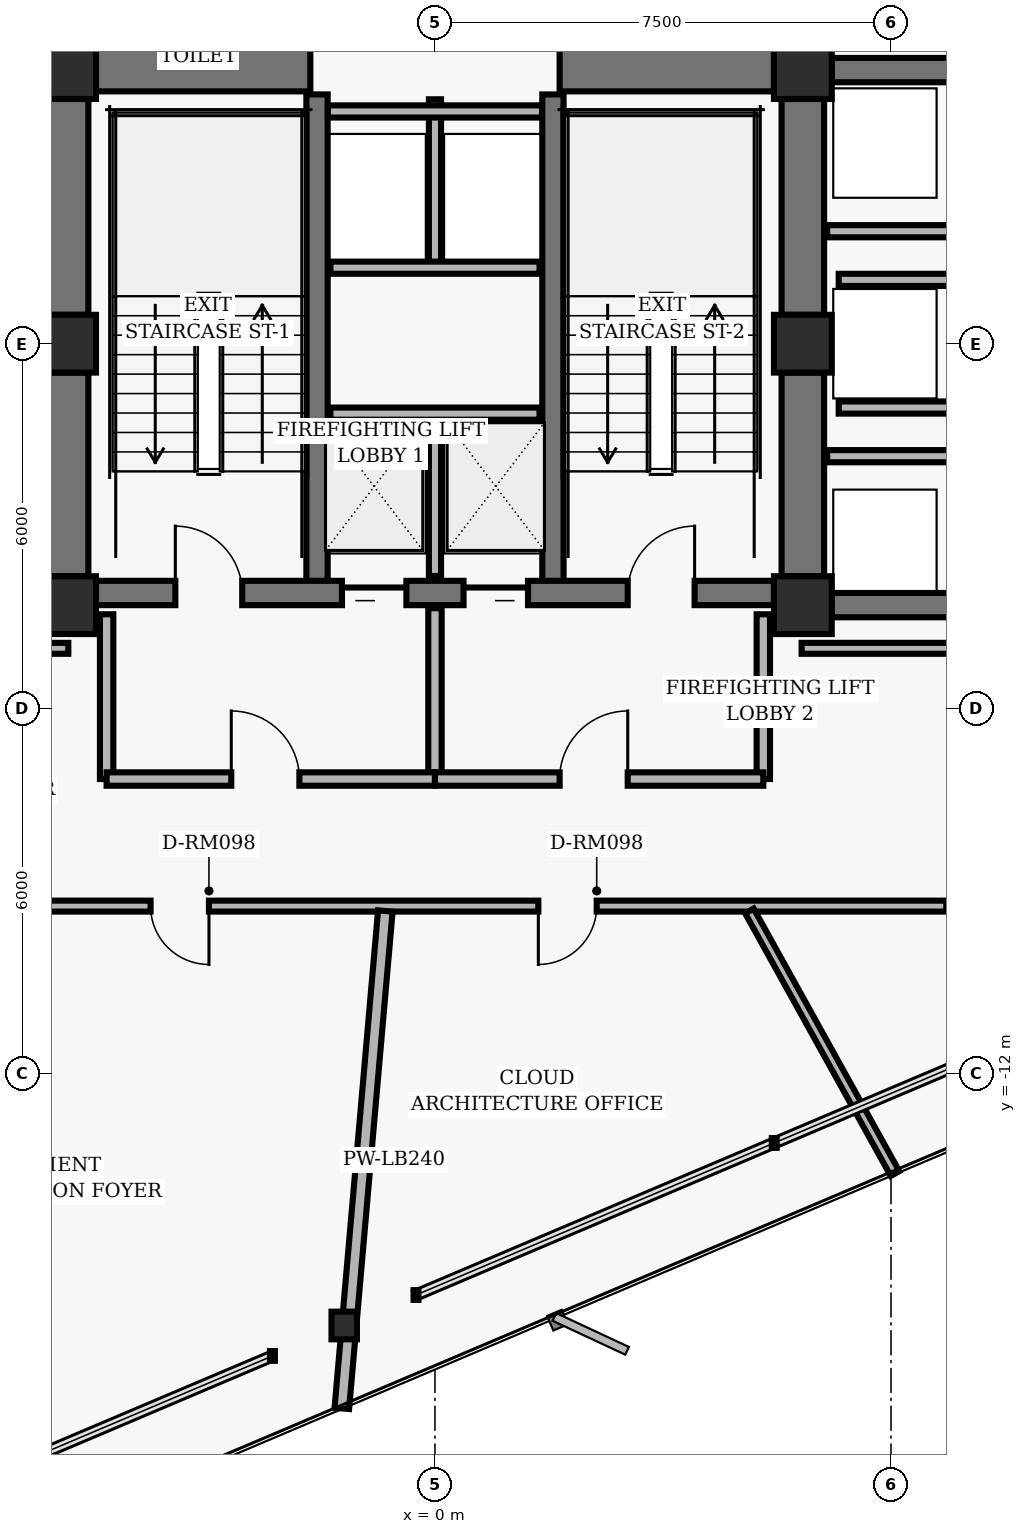
"""IFC4 building model, lengths in metres.
Left out: names, types, materials, properties, quantities, classifications, styles, units other than length and angle.
Written with IfcOpenShell. Run it as: python <this file> out.ifc"""

import sys

from ifc_helpers import new_model, si_unit, direction, frame, frame_2d, origin, origin_2d, place, context, subcontext, project, spatial, rectangle, hollow_rectangle, i_section, extrude, element, fill, save


model = new_model("IFC4")
c1 = context("Model", 3, precision=1e-05, world=origin(), true_north=direction((0.0, 1.0)))
c2 = subcontext(c1, "Body", "Model", "MODEL_VIEW")
j1 = project(units=[si_unit("LENGTHUNIT", "METRE"), si_unit("PLANEANGLEUNIT", "RADIAN")], contexts=[c1])
p1 = place(None, origin())
s1 = spatial("IfcSite", under=j1, at=p1, CompositionType="ELEMENT")
p2 = place(p1, origin())
s2 = spatial("IfcBuilding", under=s1, at=p2, CompositionType="ELEMENT")
p3 = place(p2, frame((0.0, 0.0, 66.4)))
s3 = spatial("IfcBuildingStorey", under=s2, at=p3, CompositionType="ELEMENT", Elevation=66.4)
for number, where, z_axis, x_axis in (
    (1, (-6.05, 4.5, 0.0), (0.0, 0.0, 1.0), (1.0, 0.0, 0.0)),
    (2, (6.05, 4.5, 0.0), (0.0, 0.0, 1.0), (1.0, 0.0, 0.0)),
    (3, (-6.05, 0.0, 0.0), (0.0, 0.0, 1.0), (1.0, 0.0, 0.0)),
    (4, (6.05, 0.0, 0.0), (0.0, 0.0, 1.0), (1.0, 0.0, 0.0)),
    (5, (-6.05, -4.3, 0.0), (0.0, 0.0, 1.0), (1.0, 0.0, 0.0)),
    (6, (6.05, -4.3, 0.0), (0.0, 0.0, 1.0), (1.0, 0.0, 0.0)),
):
    element("IfcColumn", number, at=place(p3, frame(where, z_axis=z_axis, x_axis=x_axis)), inside=s3, PredefinedType="COLUMN", context=c2, shape_type="SweptSolid", body=[
        extrude(hollow_rectangle(XDim=0.95, YDim=0.95, WallThickness=0.06, InnerFilletRadius=0.02, OuterFilletRadius=0.04, at=origin_2d()), origin(), (0.0, 0.0, 1.0), 3.36),
    ])
p4 = place(p3, frame((-6.05, 0.475, 0.0), z_axis=(0.0, 0.0, 1.0), x_axis=(0.0, 1.0, 0.0)))
e7 = element("IfcWall", 7, at=p4, inside=s3, PredefinedType="SHEAR", context=c2, shape_type="SweptSolid", body=[
    extrude(rectangle(XDim=3.55, YDim=0.7, at=frame_2d((1.775, 0.0))), origin(), (0.0, 0.0, 1.0), 3.098),
])
p5 = place(p3, frame((-6.05, -3.825, 0.0), z_axis=(0.0, 0.0, 1.0), x_axis=(0.0, 1.0, 0.0)))
e8 = element("IfcWall", 8, at=p5, inside=s3, PredefinedType="SHEAR", context=c2, shape_type="SweptSolid", body=[
    extrude(rectangle(XDim=3.35, YDim=0.7, at=frame_2d((1.675, 0.0))), origin(), (0.0, 0.0, 1.0), 3.098),
])
p6 = place(p3, frame((6.05, 0.475, 0.0), z_axis=(0.0, 0.0, 1.0), x_axis=(0.0, 1.0, 0.0)))
e9 = element("IfcWall", 9, at=p6, inside=s3, PredefinedType="SHEAR", context=c2, shape_type="SweptSolid", body=[
    extrude(rectangle(XDim=3.55, YDim=0.7, at=frame_2d((1.775, 0.0))), origin(), (0.0, 0.0, 1.0), 3.098),
])
p7 = place(p3, frame((6.05, -3.825, 0.0), z_axis=(0.0, 0.0, 1.0), x_axis=(0.0, 1.0, 0.0)))
e10 = element("IfcWall", 10, at=p7, inside=s3, PredefinedType="SHEAR", context=c2, shape_type="SweptSolid", body=[
    extrude(rectangle(XDim=3.35, YDim=0.7, at=frame_2d((1.675, 0.0))), origin(), (0.0, 0.0, 1.0), 3.098),
])
for number, where, z_axis, x_axis in (
    (11, (-1.94, -4.1, 0.0), (0.0, 0.0, 1.0), (0.0, 1.0, 0.0)),
    (12, (1.94, -4.1, 0.0), (0.0, 0.0, 1.0), (0.0, 1.0, 0.0)),
):
    element("IfcWall", number, at=place(p3, frame(where, z_axis=z_axis, x_axis=x_axis)), inside=s3, PredefinedType="SHEAR", context=c2, shape_type="SweptSolid", body=[
        extrude(rectangle(XDim=8.2, YDim=0.35, at=frame_2d((4.1, 0.0))), origin(), (0.0, 0.0, 1.0), 3.098),
    ])
p8 = place(p3, frame((-5.575, -4.1, 0.0), z_axis=(0.0, 0.0, 1.0), x_axis=(1.0, 0.0, 0.0)))
e13 = element("IfcWall", 13, at=p8, inside=s3, PredefinedType="SHEAR", context=c2, shape_type="SweptSolid", body=[
    extrude(rectangle(XDim=11.15, YDim=0.4, at=frame_2d((5.575, 0.0))), origin(), (0.0, 0.0, 1.0), 3.098),
])
p9 = place(p8, frame((1.305, 0.0, 0.0)))
e14 = element("IfcOpeningElement", 14, at=p9, cuts=e13, PredefinedType="OPENING", context=c2, shape_type="SweptSolid", body=[
    extrude(rectangle(XDim=1.1, YDim=2.04, at=frame_2d((0.55, 1.02))), frame((0.0, 0.21, 0.0), z_axis=(0.0, -1.0, 0.0), x_axis=(1.0, 0.0, 0.0)), (0.0, 0.0, 1.0), 0.42),
])
p10 = place(p8, frame((8.745, 0.0, 0.0)))
e15 = element("IfcOpeningElement", 15, at=p10, cuts=e13, PredefinedType="OPENING", context=c2, shape_type="SweptSolid", body=[
    extrude(rectangle(XDim=1.1, YDim=2.04, at=frame_2d((0.55, 1.02))), frame((0.0, 0.21, 0.0), z_axis=(0.0, -1.0, 0.0), x_axis=(1.0, 0.0, 0.0)), (0.0, 0.0, 1.0), 0.42),
])
p11 = place(p8, frame((4.045, 0.0, 0.0)))
e16 = element("IfcOpeningElement", 16, at=p11, cuts=e13, PredefinedType="OPENING", context=c2, shape_type="SweptSolid", body=[
    extrude(rectangle(XDim=1.06, YDim=2.04, at=frame_2d((0.53, 1.02))), frame((0.0, 0.21, 0.0), z_axis=(0.0, -1.0, 0.0), x_axis=(1.0, 0.0, 0.0)), (0.0, 0.0, 1.0), 0.42),
])
p12 = place(p8, frame((6.045, 0.0, 0.0)))
e17 = element("IfcOpeningElement", 17, at=p12, cuts=e13, PredefinedType="OPENING", context=c2, shape_type="SweptSolid", body=[
    extrude(rectangle(XDim=1.06, YDim=2.04, at=frame_2d((0.53, 1.02))), frame((0.0, 0.21, 0.0), z_axis=(0.0, -1.0, 0.0), x_axis=(1.0, 0.0, 0.0)), (0.0, 0.0, 1.0), 0.42),
])
for number, where, z_axis, x_axis in (
    (18, (-5.575, 4.5, 0.0), (0.0, 0.0, 1.0), (1.0, 0.0, 0.0)),
    (19, (2.05, 4.5, 0.0), (0.0, 0.0, 1.0), (1.0, 0.0, 0.0)),
):
    element("IfcWall", number, at=place(p3, frame(where, z_axis=z_axis, x_axis=x_axis)), inside=s3, PredefinedType="SHEAR", context=c2, shape_type="SweptSolid", body=[
        extrude(rectangle(XDim=3.525, YDim=0.7, at=frame_2d((1.762, 0.0))), origin(), (0.0, 0.0, 1.0), 3.098),
    ])
for number, where, z_axis, x_axis in (
    (20, (6.525, 4.5, 0.0), (0.0, 0.0, 1.0), (1.0, 0.0, 0.0)),
    (21, (6.525, -4.3, 0.0), (0.0, 0.0, 1.0), (1.0, 0.0, 0.0)),
):
    element("IfcWall", number, at=place(p3, frame(where, z_axis=z_axis, x_axis=x_axis)), inside=s3, PredefinedType="SHEAR", context=c2, shape_type="SweptSolid", body=[
        extrude(rectangle(XDim=1.95, YDim=0.4, at=frame_2d((0.975, 0.0))), origin(), (0.0, 0.0, 1.0), 3.098),
    ])
p13 = place(p3, frame((-1.493, -16.148, 0.0), z_axis=(0.0, 0.0, 1.0), x_axis=(1.0, 0.0, 0.0)))
e22 = element("IfcColumn", 22, at=p13, inside=s3, PredefinedType="COLUMN", context=c2, shape_type="SweptSolid", body=[
    extrude(i_section(OverallWidth=0.418, OverallDepth=0.455, WebThickness=0.042, FlangeThickness=0.068, FilletRadius=0.025, at=origin_2d()), origin(), (0.0, 0.0, 1.0), 3.36),
])
p14 = place(p3, frame((0.0, -3.82, 0.0), z_axis=(0.0, 0.0, 1.0), x_axis=(0.0, 1.0, 0.0)))
e23 = element("IfcWall", 23, at=p14, inside=s3, PredefinedType="PARTITIONING", context=c2, shape_type="SweptSolid", body=[
    extrude(rectangle(XDim=2.67, YDim=0.2, at=frame_2d((1.335, 0.0))), origin(), (0.0, 0.0, 1.0), 3.073),
])
p15 = place(p3, frame((-1.72, -1.15, 0.0), z_axis=(0.0, 0.0, 1.0), x_axis=(1.0, 0.0, 0.0)))
e24 = element("IfcWall", 24, at=p15, inside=s3, PredefinedType="PARTITIONING", context=c2, shape_type="SweptSolid", body=[
    extrude(rectangle(XDim=3.44, YDim=0.2, at=frame_2d((1.72, 0.0))), origin(), (0.0, 0.0, 1.0), 3.073),
])
for number, where, z_axis, x_axis in (
    (25, (-5.4, -7.16, 0.0), (0.0, 0.0, 1.0), (0.0, 1.0, 0.0)),
    (26, (5.4, -7.16, 0.0), (0.0, 0.0, 1.0), (0.0, 1.0, 0.0)),
):
    element("IfcWall", number, at=place(p3, frame(where, z_axis=z_axis, x_axis=x_axis)), inside=s3, PredefinedType="PARTITIONING", context=c2, shape_type="SweptSolid", body=[
        extrude(rectangle(XDim=2.71, YDim=0.22, at=frame_2d((1.355, 0.0))), origin(), (0.0, 0.0, 1.0), 3.073),
    ])
p16 = place(p3, frame((0.0, -7.16, 0.0), z_axis=(0.0, 0.0, 1.0), x_axis=(0.0, 1.0, 0.0)))
e27 = element("IfcWall", 27, at=p16, inside=s3, PredefinedType="PARTITIONING", context=c2, shape_type="SweptSolid", body=[
    extrude(rectangle(XDim=2.81, YDim=0.22, at=frame_2d((1.405, 0.0))), origin(), (0.0, 0.0, 1.0), 3.073),
])
p17 = place(p3, frame((-5.4, -7.16, 0.0), z_axis=(0.0, 0.0, 1.0), x_axis=(1.0, 0.0, 0.0)))
e28 = element("IfcWall", 28, at=p17, inside=s3, PredefinedType="PARTITIONING", context=c2, shape_type="SweptSolid", body=[
    extrude(rectangle(XDim=5.4, YDim=0.22, at=frame_2d((2.7, 0.0))), origin(), (0.0, 0.0, 1.0), 2.587),
])
p18 = place(p17, frame((2.05, 0.0, 0.0)))
e29 = element("IfcOpeningElement", 29, at=p18, cuts=e28, PredefinedType="OPENING", context=c2, shape_type="SweptSolid", body=[
    extrude(rectangle(XDim=1.12, YDim=2.02, at=frame_2d((0.56, 1.01))), frame((0.0, 0.12, 0.0), z_axis=(0.0, -1.0, 0.0), x_axis=(1.0, 0.0, 0.0)), (0.0, 0.0, 1.0), 0.24),
])
p19 = place(p3, frame((0.0, -7.16, 0.0), z_axis=(0.0, 0.0, 1.0), x_axis=(1.0, 0.0, 0.0)))
e30 = element("IfcWall", 30, at=p19, inside=s3, PredefinedType="PARTITIONING", context=c2, shape_type="SweptSolid", body=[
    extrude(rectangle(XDim=5.4, YDim=0.22, at=frame_2d((2.7, 0.0))), origin(), (0.0, 0.0, 1.0), 2.587),
])
p20 = place(p19, frame((2.05, 0.0, 0.0)))
e31 = element("IfcOpeningElement", 31, at=p20, cuts=e30, PredefinedType="OPENING", context=c2, shape_type="SweptSolid", body=[
    extrude(rectangle(XDim=1.12, YDim=2.02, at=frame_2d((0.56, 1.01))), frame((0.0, 0.12, 0.0), z_axis=(0.0, -1.0, 0.0), x_axis=(1.0, 0.0, 0.0)), (0.0, 0.0, 1.0), 0.24),
])
p21 = place(p3, frame((0.0, 1.25, 0.0), z_axis=(0.0, 0.0, 1.0), x_axis=(0.0, 1.0, 0.0)))
e32 = element("IfcWall", 32, at=p21, inside=s3, PredefinedType="PARTITIONING", context=c2, shape_type="SweptSolid", body=[
    extrude(rectangle(XDim=2.77, YDim=0.2, at=frame_2d((1.385, 0.0))), origin(), (0.0, 0.0, 1.0), 3.073),
])
p22 = place(p3, frame((-1.72, 1.25, 0.0), z_axis=(0.0, 0.0, 1.0), x_axis=(1.0, 0.0, 0.0)))
e33 = element("IfcWall", 33, at=p22, inside=s3, PredefinedType="PARTITIONING", context=c2, shape_type="SweptSolid", body=[
    extrude(rectangle(XDim=3.44, YDim=0.2, at=frame_2d((1.72, 0.0))), origin(), (0.0, 0.0, 1.0), 3.073),
])
p23 = place(p3, frame((-1.76, 3.82, 0.0), z_axis=(0.0, 0.0, 1.0), x_axis=(1.0, 0.0, 0.0)))
e34 = element("IfcWall", 34, at=p23, inside=s3, PredefinedType="PARTITIONING", context=c2, shape_type="SweptSolid", body=[
    extrude(rectangle(XDim=3.52, YDim=0.2, at=frame_2d((1.76, 0.0))), origin(), (0.0, 0.0, 1.0), 3.073),
])
for number, where, z_axis, x_axis in (
    (35, (6.45, -1.85, 0.0), (0.0, 0.0, 1.0), (1.0, 0.0, 0.0)),
    (36, (6.45, 1.85, 0.0), (0.0, 0.0, 1.0), (1.0, 0.0, 0.0)),
):
    element("IfcWall", number, at=place(p3, frame(where, z_axis=z_axis, x_axis=x_axis)), inside=s3, PredefinedType="PARTITIONING", context=c2, shape_type="SweptSolid", body=[
        extrude(rectangle(XDim=2.1, YDim=0.2, at=frame_2d((1.05, 0.0))), origin(), (0.0, 0.0, 1.0), 3.073),
    ])
for number, where, z_axis, x_axis in (
    (37, (6.64, -1.05, 0.0), (0.0, 0.0, 1.0), (1.0, 0.0, 0.0)),
    (38, (6.64, 1.05, 0.0), (0.0, 0.0, 1.0), (1.0, 0.0, 0.0)),
):
    element("IfcWall", number, at=place(p3, frame(where, z_axis=z_axis, x_axis=x_axis)), inside=s3, PredefinedType="PARTITIONING", context=c2, shape_type="SweptSolid", body=[
        extrude(rectangle(XDim=1.91, YDim=0.2, at=frame_2d((0.955, 0.0))), origin(), (0.0, 0.0, 1.0), 3.073),
    ])
p24 = place(p3, frame((13.268, -5.141, 0.0), z_axis=(0.0, 0.0, 1.0), x_axis=(-0.757534501725, -0.65279512766, 0.0)))
e39 = element("IfcWall", 39, at=p24, inside=s3, PredefinedType="PARTITIONING", context=c2, shape_type="SweptSolid", body=[
    extrude(rectangle(XDim=6.385, YDim=0.18, at=frame_2d((3.192, 0.0))), origin(), (0.0, 0.0, 1.0), 3.073),
])
p25 = place(p24, frame((3.346, 0.0, 0.0)))
e40 = element("IfcOpeningElement", 40, at=p25, cuts=e39, PredefinedType="OPENING", context=c2, shape_type="SweptSolid", body=[
    extrude(rectangle(XDim=0.96, YDim=2.02, at=frame_2d((0.48, 1.01))), frame((0.0, 0.1, 0.0), z_axis=(0.0, -1.0, 0.0), x_axis=(1.0, 0.0, 0.0)), (0.0, 0.0, 1.0), 0.2),
])
p26 = place(p3, frame((8.41, -9.25, 0.0), z_axis=(0.0, 0.0, 1.0), x_axis=(-1.0, 0.0, 0.0)))
e41 = element("IfcWall", 41, at=p26, inside=s3, PredefinedType="PARTITIONING", context=c2, shape_type="SweptSolid", body=[
    extrude(rectangle(XDim=17.0, YDim=0.18, at=frame_2d((8.5, 0.0))), origin(), (0.0, 0.0, 1.0), 2.587),
])
p27 = place(p26, frame((12.127, 0.0, 0.0)))
e42 = element("IfcOpeningElement", 42, at=p27, cuts=e41, PredefinedType="OPENING", context=c2, shape_type="SweptSolid", body=[
    extrude(rectangle(XDim=0.96, YDim=2.02, at=frame_2d((0.48, 1.01))), frame((0.0, 0.1, 0.0), z_axis=(0.0, -1.0, 0.0), x_axis=(1.0, 0.0, 0.0)), (0.0, 0.0, 1.0), 0.2),
])
p28 = place(p26, frame((5.75, 0.0, 0.0)))
e43 = element("IfcOpeningElement", 43, at=p28, cuts=e41, PredefinedType="OPENING", context=c2, shape_type="SweptSolid", body=[
    extrude(rectangle(XDim=0.96, YDim=2.02, at=frame_2d((0.48, 1.01))), frame((0.0, 0.1, 0.0), z_axis=(0.0, -1.0, 0.0), x_axis=(1.0, 0.0, 0.0)), (0.0, 0.0, 1.0), 0.2),
])
for number, where, z_axis, x_axis in (
    (44, (-9.37, -5.01, 0.0), (0.0, 0.0, 1.0), (1.0, 0.0, 0.0)),
    (45, (6.03, -5.01, 0.0), (0.0, 0.0, 1.0), (1.0, 0.0, 0.0)),
):
    element("IfcWall", number, at=place(p3, frame(where, z_axis=z_axis, x_axis=x_axis)), inside=s3, PredefinedType="PARTITIONING", context=c2, shape_type="SweptSolid", body=[
        extrude(rectangle(XDim=3.34, YDim=0.18, at=frame_2d((1.67, 0.0))), origin(), (0.0, 0.0, 1.0), 3.073),
    ])
p29 = place(p3, frame((-0.816, -9.33, 0.0), z_axis=(0.0, 0.0, 1.0), x_axis=(-0.087131179551, -0.996196846788, 0.0)))
e46 = element("IfcWall", 46, at=p29, inside=s3, PredefinedType="PARTITIONING", context=c2, shape_type="SweptSolid", body=[
    extrude(rectangle(XDim=8.213, YDim=0.24, at=frame_2d((4.106, 0.0))), origin(), (0.0, 0.0, 1.0), 3.073),
])
p30 = place(p3, frame((5.172, -9.33, 0.0), z_axis=(0.0, 0.0, 1.0), x_axis=(0.484815832005, -0.874616263876, 0.0)))
e47 = element("IfcWall", 47, at=p30, inside=s3, PredefinedType="PARTITIONING", context=c2, shape_type="SweptSolid", body=[
    extrude(rectangle(XDim=4.938, YDim=0.16, at=frame_2d((2.469, 0.0))), origin(), (0.0, 0.0, 1.0), 3.073),
])
p31 = place(p9, origin())
e48 = element("IfcDoor", 48, at=p31, inside=s3, OperationType="SINGLE_SWING_LEFT", PredefinedType="DOOR", context=c2, shape_type="SweptSolid", body=[
    extrude(rectangle(XDim=1.1, YDim=2.04, at=frame_2d((0.55, 1.02))), frame((0.0, 0.025, 0.0), z_axis=(0.0, -1.0, 0.0), x_axis=(1.0, 0.0, 0.0)), (0.0, 0.0, 1.0), 0.05),
])
fill(e14, e48)
p32 = place(p10, origin())
e49 = element("IfcDoor", 49, at=p32, inside=s3, OperationType="SINGLE_SWING_RIGHT", PredefinedType="DOOR", context=c2, shape_type="SweptSolid", body=[
    extrude(rectangle(XDim=1.1, YDim=2.04, at=frame_2d((0.55, 1.02))), frame((0.0, 0.025, 0.0), z_axis=(0.0, -1.0, 0.0), x_axis=(1.0, 0.0, 0.0)), (0.0, 0.0, 1.0), 0.05),
])
fill(e15, e49)
p33 = place(p11, origin())
e50 = element("IfcDoor", 50, at=p33, inside=s3, OperationType="SLIDING_TO_LEFT", PredefinedType="DOOR", context=c2, shape_type="SweptSolid", body=[
    extrude(rectangle(XDim=1.06, YDim=2.04, at=frame_2d((0.53, 1.02))), frame((0.0, 0.025, 0.0), z_axis=(0.0, -1.0, 0.0), x_axis=(1.0, 0.0, 0.0)), (0.0, 0.0, 1.0), 0.05),
])
fill(e16, e50)
p34 = place(p12, origin())
e51 = element("IfcDoor", 51, at=p34, inside=s3, OperationType="SLIDING_TO_RIGHT", PredefinedType="DOOR", context=c2, shape_type="SweptSolid", body=[
    extrude(rectangle(XDim=1.06, YDim=2.04, at=frame_2d((0.53, 1.02))), frame((0.0, 0.025, 0.0), z_axis=(0.0, -1.0, 0.0), x_axis=(1.0, 0.0, 0.0)), (0.0, 0.0, 1.0), 0.05),
])
fill(e17, e51)
p35 = place(p18, origin())
e52 = element("IfcDoor", 52, at=p35, inside=s3, OperationType="SINGLE_SWING_LEFT", PredefinedType="DOOR", context=c2, shape_type="SweptSolid", body=[
    extrude(rectangle(XDim=1.12, YDim=2.02, at=frame_2d((0.56, 1.01))), frame((0.0, 0.025, 0.0), z_axis=(0.0, -1.0, 0.0), x_axis=(1.0, 0.0, 0.0)), (0.0, 0.0, 1.0), 0.05),
])
fill(e29, e52)
p36 = place(p20, origin())
e53 = element("IfcDoor", 53, at=p36, inside=s3, OperationType="SINGLE_SWING_RIGHT", PredefinedType="DOOR", context=c2, shape_type="SweptSolid", body=[
    extrude(rectangle(XDim=1.12, YDim=2.02, at=frame_2d((0.56, 1.01))), frame((0.0, 0.025, 0.0), z_axis=(0.0, -1.0, 0.0), x_axis=(1.0, 0.0, 0.0)), (0.0, 0.0, 1.0), 0.05),
])
fill(e31, e53)
p37 = place(p27, origin())
e54 = element("IfcDoor", 54, at=p37, inside=s3, OperationType="SINGLE_SWING_LEFT", PredefinedType="DOOR", context=c2, shape_type="SweptSolid", body=[
    extrude(rectangle(XDim=0.96, YDim=2.02, at=frame_2d((0.48, 1.01))), frame((0.0, 0.025, 0.0), z_axis=(0.0, -1.0, 0.0), x_axis=(1.0, 0.0, 0.0)), (0.0, 0.0, 1.0), 0.05),
])
fill(e42, e54)
p38 = place(p28, origin())
e55 = element("IfcDoor", 55, at=p38, inside=s3, OperationType="SINGLE_SWING_RIGHT", PredefinedType="DOOR", context=c2, shape_type="SweptSolid", body=[
    extrude(rectangle(XDim=0.96, YDim=2.02, at=frame_2d((0.48, 1.01))), frame((0.0, 0.025, 0.0), z_axis=(0.0, -1.0, 0.0), x_axis=(1.0, 0.0, 0.0)), (0.0, 0.0, 1.0), 0.05),
])
fill(e43, e55)
save(model, sys.argv[1])
